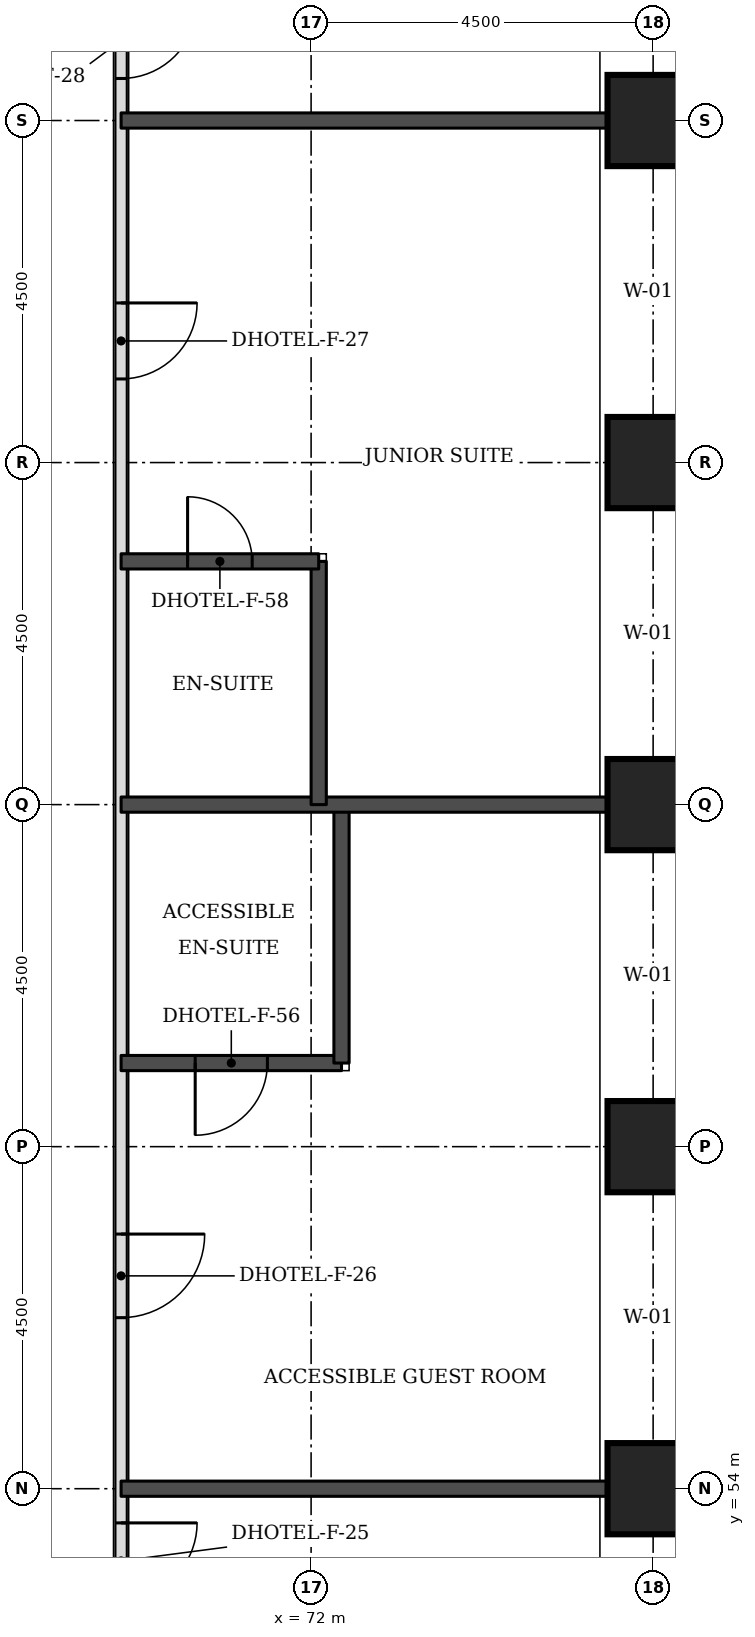
"""IFC4 building model, lengths in metres.
Left out: names, types, materials, properties, quantities, classifications, styles, units other than length and angle.
Written with IfcOpenShell. Run it as: python <this file> out.ifc"""

import sys

from ifc_helpers import new_model, si_unit, direction, frame, frame_2d, origin, origin_2d, place, context, subcontext, project, spatial, rectangle, extrude, element, fill, save


model = new_model("IFC4")
c1 = context("Model", 3, precision=1e-05, world=origin(), true_north=direction((0.0, 1.0)))
c2 = subcontext(c1, "Body", "Model", "MODEL_VIEW")
j1 = project(units=[si_unit("LENGTHUNIT", "METRE"), si_unit("PLANEANGLEUNIT", "RADIAN")], contexts=[c1])
p1 = place(None, origin())
s1 = spatial("IfcSite", under=j1, at=p1, CompositionType="ELEMENT")
p2 = place(p1, origin())
s2 = spatial("IfcBuilding", under=s1, at=p2, CompositionType="ELEMENT")
p3 = place(p2, frame((0.0, 0.0, 42.9)))
s3 = spatial("IfcBuildingStorey", under=s2, at=p3, CompositionType="ELEMENT", Elevation=42.9)
for number, where, z_axis, x_axis in (
    (1, (76.5, 54.0, 0.0), (0.0, 0.0, 1.0), (1.0, 0.0, 0.0)),
    (2, (76.5, 58.5, 0.0), (0.0, 0.0, 1.0), (1.0, 0.0, 0.0)),
    (3, (76.5, 63.0, 0.0), (0.0, 0.0, 1.0), (1.0, 0.0, 0.0)),
    (4, (76.5, 67.5, 0.0), (0.0, 0.0, 1.0), (1.0, 0.0, 0.0)),
    (5, (76.5, 72.0, 0.0), (0.0, 0.0, 1.0), (1.0, 0.0, 0.0)),
):
    element("IfcColumn", number, at=place(p3, frame(where, z_axis=z_axis, x_axis=x_axis)), inside=s3, PredefinedType="COLUMN", context=c2, shape_type="SweptSolid", body=[
        extrude(rectangle(XDim=1.2, YDim=1.2, at=origin_2d()), origin(), (0.0, 0.0, 1.0), 3.3),
    ])
p4 = place(p3, frame((69.5, 47.5, 0.0), z_axis=(0.0, 0.0, 1.0), x_axis=(0.0, 1.0, 0.0)))
e6 = element("IfcWall", 6, at=p4, inside=s3, PredefinedType="PARTITIONING", context=c2, shape_type="SweptSolid", body=[
    extrude(rectangle(XDim=26.5, YDim=0.15, at=frame_2d((13.25, 0.0))), origin(), (0.0, 0.0, 1.0), 3.08),
])
p5 = place(p4, frame((25.053, 0.0, 0.0)))
e7 = element("IfcOpeningElement", 7, at=p5, cuts=e6, PredefinedType="OPENING", context=c2, shape_type="SweptSolid", body=[
    extrude(rectangle(XDim=1.0, YDim=2.1, at=frame_2d((0.5, 1.05))), frame((0.0, 0.085, 0.0), z_axis=(0.0, -1.0, 0.0), x_axis=(1.0, 0.0, 0.0)), (0.0, 0.0, 1.0), 0.17),
])
p6 = place(p4, frame((21.1, 0.0, 0.0)))
e8 = element("IfcOpeningElement", 8, at=p6, cuts=e6, PredefinedType="OPENING", context=c2, shape_type="SweptSolid", body=[
    extrude(rectangle(XDim=1.0, YDim=2.1, at=frame_2d((0.5, 1.05))), frame((0.0, 0.085, 0.0), z_axis=(0.0, -1.0, 0.0), x_axis=(1.0, 0.0, 0.0)), (0.0, 0.0, 1.0), 0.17),
])
p7 = place(p4, frame((8.75, 0.0, 0.0)))
e9 = element("IfcOpeningElement", 9, at=p7, cuts=e6, PredefinedType="OPENING", context=c2, shape_type="SweptSolid", body=[
    extrude(rectangle(XDim=1.1, YDim=2.1, at=frame_2d((0.55, 1.05))), frame((0.0, 0.085, 0.0), z_axis=(0.0, -1.0, 0.0), x_axis=(1.0, 0.0, 0.0)), (0.0, 0.0, 1.0), 0.17),
])
p8 = place(p4, frame((5.05, 0.0, 0.0)))
e10 = element("IfcOpeningElement", 10, at=p8, cuts=e6, PredefinedType="OPENING", context=c2, shape_type="SweptSolid", body=[
    extrude(rectangle(XDim=1.0, YDim=2.1, at=frame_2d((0.5, 1.05))), frame((0.0, 0.085, 0.0), z_axis=(0.0, -1.0, 0.0), x_axis=(1.0, 0.0, 0.0)), (0.0, 0.0, 1.0), 0.17),
])
p9 = place(p4, frame((0.447, 0.0, 0.0)))
e11 = element("IfcOpeningElement", 11, at=p9, cuts=e6, PredefinedType="OPENING", context=c2, shape_type="SweptSolid", body=[
    extrude(rectangle(XDim=1.0, YDim=2.1, at=frame_2d((0.5, 1.05))), frame((0.0, 0.085, 0.0), z_axis=(0.0, -1.0, 0.0), x_axis=(1.0, 0.0, 0.0)), (0.0, 0.0, 1.0), 0.17),
])
p10 = place(p3, frame((69.5, 54.0, 0.0), z_axis=(0.0, 0.0, 1.0), x_axis=(1.0, 0.0, 0.0)))
e12 = element("IfcWall", 12, at=p10, inside=s3, PredefinedType="SOLIDWALL", context=c2, shape_type="SweptSolid", body=[
    extrude(rectangle(XDim=6.4, YDim=0.2, at=frame_2d((3.2, 0.0))), origin(), (0.0, 0.0, 1.0), 3.08),
])
p11 = place(p3, frame((69.5, 59.6, 0.0), z_axis=(0.0, 0.0, 1.0), x_axis=(1.0, 0.0, 0.0)))
e13 = element("IfcWall", 13, at=p11, inside=s3, PredefinedType="SOLIDWALL", context=c2, shape_type="SweptSolid", body=[
    extrude(rectangle(XDim=2.9, YDim=0.2, at=frame_2d((1.45, 0.0))), origin(), (0.0, 0.0, 1.0), 3.08),
])
p12 = place(p11, frame((0.975, 0.0, 0.0)))
e14 = element("IfcOpeningElement", 14, at=p12, cuts=e13, PredefinedType="OPENING", context=c2, shape_type="SweptSolid", body=[
    extrude(rectangle(XDim=0.95, YDim=2.1, at=frame_2d((0.475, 1.05))), frame((0.0, 0.11, 0.0), z_axis=(0.0, -1.0, 0.0), x_axis=(1.0, 0.0, 0.0)), (0.0, 0.0, 1.0), 0.22),
])
p13 = place(p3, frame((72.4, 59.6, 0.0), z_axis=(0.0, 0.0, 1.0), x_axis=(0.0, 1.0, 0.0)))
e15 = element("IfcWall", 15, at=p13, inside=s3, PredefinedType="SOLIDWALL", context=c2, shape_type="SweptSolid", body=[
    extrude(rectangle(XDim=3.4, YDim=0.2, at=frame_2d((1.7, 0.0))), origin(), (0.0, 0.0, 1.0), 3.08),
])
p14 = place(p3, frame((69.5, 63.0, 0.0), z_axis=(0.0, 0.0, 1.0), x_axis=(1.0, 0.0, 0.0)))
e16 = element("IfcWall", 16, at=p14, inside=s3, PredefinedType="SOLIDWALL", context=c2, shape_type="SweptSolid", body=[
    extrude(rectangle(XDim=6.4, YDim=0.2, at=frame_2d((3.2, 0.0))), origin(), (0.0, 0.0, 1.0), 3.08),
])
p15 = place(p3, frame((72.1, 63.0, 0.0), z_axis=(0.0, 0.0, 1.0), x_axis=(0.0, 1.0, 0.0)))
e17 = element("IfcWall", 17, at=p15, inside=s3, PredefinedType="SOLIDWALL", context=c2, shape_type="SweptSolid", body=[
    extrude(rectangle(XDim=3.2, YDim=0.2, at=frame_2d((1.6, 0.0))), origin(), (0.0, 0.0, 1.0), 3.08),
])
p16 = place(p3, frame((69.5, 66.2, 0.0), z_axis=(0.0, 0.0, 1.0), x_axis=(1.0, 0.0, 0.0)))
e18 = element("IfcWall", 18, at=p16, inside=s3, PredefinedType="SOLIDWALL", context=c2, shape_type="SweptSolid", body=[
    extrude(rectangle(XDim=2.6, YDim=0.2, at=frame_2d((1.3, 0.0))), origin(), (0.0, 0.0, 1.0), 3.08),
])
p17 = place(p16, frame((0.875, 0.0, 0.0)))
e19 = element("IfcOpeningElement", 19, at=p17, cuts=e18, PredefinedType="OPENING", context=c2, shape_type="SweptSolid", body=[
    extrude(rectangle(XDim=0.85, YDim=2.1, at=frame_2d((0.425, 1.05))), frame((0.0, 0.11, 0.0), z_axis=(0.0, -1.0, 0.0), x_axis=(1.0, 0.0, 0.0)), (0.0, 0.0, 1.0), 0.22),
])
p18 = place(p3, frame((69.5, 72.0, 0.0), z_axis=(0.0, 0.0, 1.0), x_axis=(1.0, 0.0, 0.0)))
e20 = element("IfcWall", 20, at=p18, inside=s3, PredefinedType="SOLIDWALL", context=c2, shape_type="SweptSolid", body=[
    extrude(rectangle(XDim=6.4, YDim=0.2, at=frame_2d((3.2, 0.0))), origin(), (0.0, 0.0, 1.0), 3.08),
])
p19 = place(p5, frame((1.0, 0.0, 0.0), z_axis=(0.0, 0.0, 1.0), x_axis=(-1.0, 0.0, 0.0)))
e21 = element("IfcDoor", 21, at=p19, inside=s3, OperationType="SINGLE_SWING_LEFT", PredefinedType="DOOR", context=c2, shape_type="SweptSolid", body=[
    extrude(rectangle(XDim=1.0, YDim=2.1, at=frame_2d((0.5, 1.05))), frame((0.0, 0.025, 0.0), z_axis=(0.0, -1.0, 0.0), x_axis=(1.0, 0.0, 0.0)), (0.0, 0.0, 1.0), 0.05),
])
fill(e7, e21)
p20 = place(p6, frame((1.0, 0.0, 0.0), z_axis=(0.0, 0.0, 1.0), x_axis=(-1.0, 0.0, 0.0)))
e22 = element("IfcDoor", 22, at=p20, inside=s3, OperationType="SINGLE_SWING_LEFT", PredefinedType="DOOR", context=c2, shape_type="SweptSolid", body=[
    extrude(rectangle(XDim=1.0, YDim=2.1, at=frame_2d((0.5, 1.05))), frame((0.0, 0.025, 0.0), z_axis=(0.0, -1.0, 0.0), x_axis=(1.0, 0.0, 0.0)), (0.0, 0.0, 1.0), 0.05),
])
fill(e8, e22)
p21 = place(p17, origin())
e23 = element("IfcDoor", 23, at=p21, inside=s3, OperationType="SINGLE_SWING_LEFT", PredefinedType="DOOR", context=c2, shape_type="SweptSolid", body=[
    extrude(rectangle(XDim=0.85, YDim=2.1, at=frame_2d((0.425, 1.05))), frame((0.0, 0.025, 0.0), z_axis=(0.0, -1.0, 0.0), x_axis=(1.0, 0.0, 0.0)), (0.0, 0.0, 1.0), 0.05),
])
fill(e19, e23)
p22 = place(p7, frame((1.1, 0.0, 0.0), z_axis=(0.0, 0.0, 1.0), x_axis=(-1.0, 0.0, 0.0)))
e24 = element("IfcDoor", 24, at=p22, inside=s3, OperationType="SINGLE_SWING_LEFT", PredefinedType="DOOR", context=c2, shape_type="SweptSolid", body=[
    extrude(rectangle(XDim=1.1, YDim=2.1, at=frame_2d((0.55, 1.05))), frame((0.0, 0.025, 0.0), z_axis=(0.0, -1.0, 0.0), x_axis=(1.0, 0.0, 0.0)), (0.0, 0.0, 1.0), 0.05),
])
fill(e9, e24)
p23 = place(p12, frame((0.95, 0.0, 0.0), z_axis=(0.0, 0.0, 1.0), x_axis=(-1.0, 0.0, 0.0)))
e25 = element("IfcDoor", 25, at=p23, inside=s3, OperationType="SINGLE_SWING_RIGHT", PredefinedType="DOOR", context=c2, shape_type="SweptSolid", body=[
    extrude(rectangle(XDim=0.95, YDim=2.1, at=frame_2d((0.475, 1.05))), frame((0.0, 0.025, 0.0), z_axis=(0.0, -1.0, 0.0), x_axis=(1.0, 0.0, 0.0)), (0.0, 0.0, 1.0), 0.05),
])
fill(e14, e25)
p24 = place(p8, frame((1.0, 0.0, 0.0), z_axis=(0.0, 0.0, 1.0), x_axis=(-1.0, 0.0, 0.0)))
e26 = element("IfcDoor", 26, at=p24, inside=s3, OperationType="SINGLE_SWING_LEFT", PredefinedType="DOOR", context=c2, shape_type="SweptSolid", body=[
    extrude(rectangle(XDim=1.0, YDim=2.1, at=frame_2d((0.5, 1.05))), frame((0.0, 0.025, 0.0), z_axis=(0.0, -1.0, 0.0), x_axis=(1.0, 0.0, 0.0)), (0.0, 0.0, 1.0), 0.05),
])
fill(e10, e26)
save(model, sys.argv[1])
